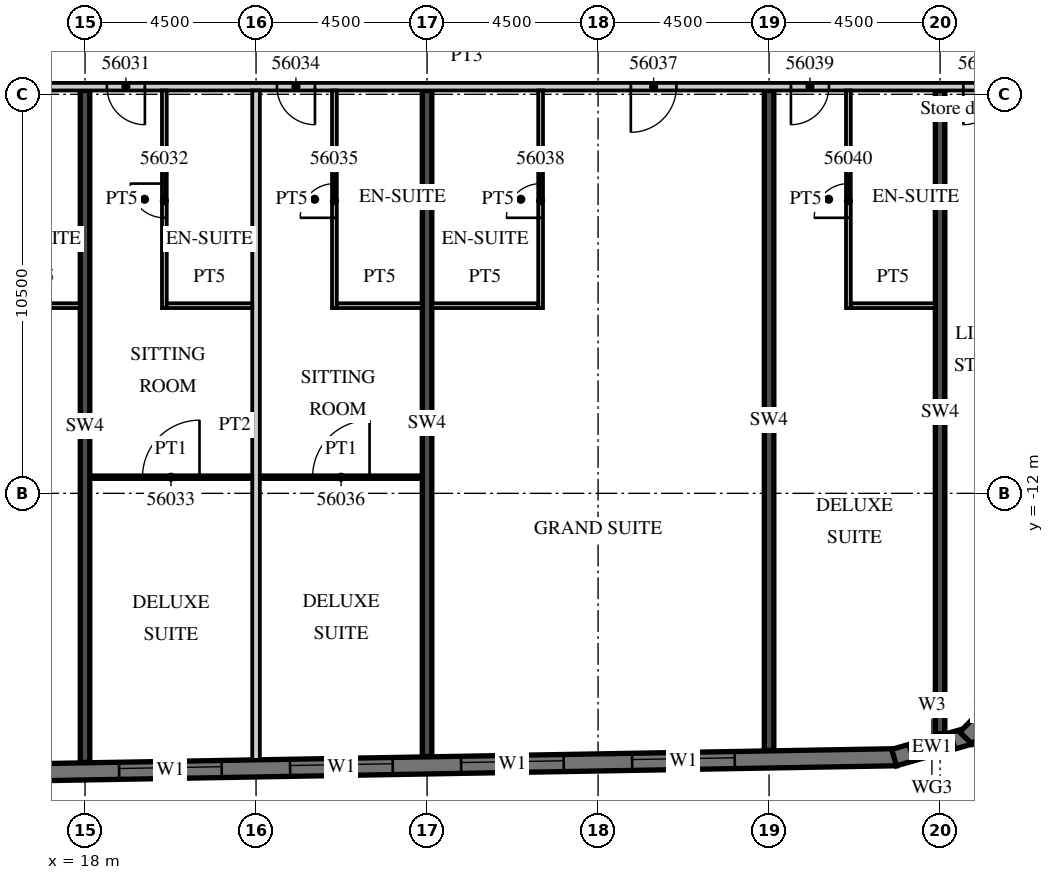
"""IFC4 building model, lengths in metres.
Left out: names, types, materials, properties, quantities, classifications, styles, units other than length and angle.
Written with IfcOpenShell. Run it as: python <this file> out.ifc"""

import sys

from ifc_helpers import new_model, si_unit, direction, frame, frame_2d, origin, place, context, subcontext, project, spatial, polyline, rectangle, outline, extrude, element, fill, save


model = new_model("IFC4")
c1 = context("Model", 3, precision=1e-05, world=origin(), true_north=direction((0.0, 1.0)))
c2 = subcontext(c1, "Body", "Model", "MODEL_VIEW")
j1 = project(units=[si_unit("LENGTHUNIT", "METRE"), si_unit("PLANEANGLEUNIT", "RADIAN")], contexts=[c1])
p1 = place(None, origin())
s1 = spatial("IfcSite", under=j1, at=p1, CompositionType="ELEMENT")
p2 = place(p1, origin())
s2 = spatial("IfcBuilding", under=s1, at=p2, CompositionType="ELEMENT")
p3 = place(p2, frame((0.0, 0.0, 230.9)))
s3 = spatial("IfcBuildingStorey", under=s2, at=p3, CompositionType="ELEMENT", Elevation=230.9)
p4 = place(p3, frame((18.0, -19.079, 0.0), z_axis=(0.0, 0.0, 1.0), x_axis=(0.0, 1.0, 0.0)))
e1 = element("IfcWall", 1, at=p4, inside=s3, PredefinedType="SHEAR", context=c2, shape_type="SweptSolid", body=[
    extrude(rectangle(XDim=17.679, YDim=0.25, at=frame_2d((8.84, 0.0))), origin(), (0.0, 0.0, 1.0), 3.3),
])
p5 = place(p3, frame((27.0, -18.922, 0.0), z_axis=(0.0, 0.0, 1.0), x_axis=(0.0, 1.0, 0.0)))
e2 = element("IfcWall", 2, at=p5, inside=s3, PredefinedType="SHEAR", context=c2, shape_type="SweptSolid", body=[
    extrude(rectangle(XDim=17.522, YDim=0.25, at=frame_2d((8.761, 0.0))), origin(), (0.0, 0.0, 1.0), 3.3),
])
p6 = place(p3, frame((36.0, -18.765, 0.0), z_axis=(0.0, 0.0, 1.0), x_axis=(0.0, 1.0, 0.0)))
e3 = element("IfcWall", 3, at=p6, inside=s3, PredefinedType="SHEAR", context=c2, shape_type="SweptSolid", body=[
    extrude(rectangle(XDim=17.365, YDim=0.25, at=frame_2d((8.683, 0.0))), origin(), (0.0, 0.0, 1.0), 3.3),
])
p7 = place(p3, frame((40.5, -18.325, 0.0), z_axis=(0.0, 0.0, 1.0), x_axis=(0.0, 1.0, 0.0)))
e4 = element("IfcWall", 4, at=p7, inside=s3, PredefinedType="SHEAR", context=c2, shape_type="SweptSolid", body=[
    extrude(rectangle(XDim=16.925, YDim=0.25, at=frame_2d((8.463, 0.0))), origin(), (0.0, 0.0, 1.0), 3.3),
])
p8 = place(p3, frame((-13.504, -19.866, 0.0), z_axis=(0.0, 0.0, 1.0), x_axis=(0.999847672978, 0.017453676992, 0.0)))
e5 = element("IfcWall", 5, at=p8, inside=s3, PredefinedType="SOLIDWALL", context=c2, shape_type="SweptSolid", body=[
    extrude(rectangle(XDim=52.86, YDim=0.45, at=frame_2d((26.43, 0.0))), origin(), (0.0, 0.0, 1.0), 3.02),
])
p9 = place(p8, frame((0.9, 0.0, 0.45)))
e6 = element("IfcOpeningElement", 6, at=p9, cuts=e5, PredefinedType="OPENING", context=c2, shape_type="SweptSolid", body=[
    extrude(rectangle(XDim=2.7, YDim=2.25, at=frame_2d((1.35, 1.125))), frame((0.0, 0.235, 0.0), z_axis=(0.0, -1.0, 0.0), x_axis=(1.0, 0.0, 0.0)), (0.0, 0.0, 1.0), 0.47),
])
p10 = place(p8, frame((5.401, 0.0, 0.45)))
e7 = element("IfcOpeningElement", 7, at=p10, cuts=e5, PredefinedType="OPENING", context=c2, shape_type="SweptSolid", body=[
    extrude(rectangle(XDim=2.7, YDim=2.25, at=frame_2d((1.35, 1.125))), frame((0.0, 0.235, 0.0), z_axis=(0.0, -1.0, 0.0), x_axis=(1.0, 0.0, 0.0)), (0.0, 0.0, 1.0), 0.47),
])
p11 = place(p8, frame((9.902, 0.0, 0.45)))
e8 = element("IfcOpeningElement", 8, at=p11, cuts=e5, PredefinedType="OPENING", context=c2, shape_type="SweptSolid", body=[
    extrude(rectangle(XDim=2.7, YDim=2.25, at=frame_2d((1.35, 1.125))), frame((0.0, 0.235, 0.0), z_axis=(0.0, -1.0, 0.0), x_axis=(1.0, 0.0, 0.0)), (0.0, 0.0, 1.0), 0.47),
])
p12 = place(p8, frame((14.402, 0.0, 0.45)))
e9 = element("IfcOpeningElement", 9, at=p12, cuts=e5, PredefinedType="OPENING", context=c2, shape_type="SweptSolid", body=[
    extrude(rectangle(XDim=2.7, YDim=2.25, at=frame_2d((1.35, 1.125))), frame((0.0, 0.235, 0.0), z_axis=(0.0, -1.0, 0.0), x_axis=(1.0, 0.0, 0.0)), (0.0, 0.0, 1.0), 0.47),
])
p13 = place(p8, frame((18.903, 0.0, 0.45)))
e10 = element("IfcOpeningElement", 10, at=p13, cuts=e5, PredefinedType="OPENING", context=c2, shape_type="SweptSolid", body=[
    extrude(rectangle(XDim=2.7, YDim=2.25, at=frame_2d((1.35, 1.125))), frame((0.0, 0.235, 0.0), z_axis=(0.0, -1.0, 0.0), x_axis=(1.0, 0.0, 0.0)), (0.0, 0.0, 1.0), 0.47),
])
p14 = place(p8, frame((23.404, 0.0, 0.45)))
e11 = element("IfcOpeningElement", 11, at=p14, cuts=e5, PredefinedType="OPENING", context=c2, shape_type="SweptSolid", body=[
    extrude(rectangle(XDim=2.7, YDim=2.25, at=frame_2d((1.35, 1.125))), frame((0.0, 0.235, 0.0), z_axis=(0.0, -1.0, 0.0), x_axis=(1.0, 0.0, 0.0)), (0.0, 0.0, 1.0), 0.47),
])
p15 = place(p8, frame((27.904, 0.0, 0.45)))
e12 = element("IfcOpeningElement", 12, at=p15, cuts=e5, PredefinedType="OPENING", context=c2, shape_type="SweptSolid", body=[
    extrude(rectangle(XDim=2.7, YDim=2.25, at=frame_2d((1.35, 1.125))), frame((0.0, 0.235, 0.0), z_axis=(0.0, -1.0, 0.0), x_axis=(1.0, 0.0, 0.0)), (0.0, 0.0, 1.0), 0.47),
])
p16 = place(p8, frame((32.405, 0.0, 0.45)))
e13 = element("IfcOpeningElement", 13, at=p16, cuts=e5, PredefinedType="OPENING", context=c2, shape_type="SweptSolid", body=[
    extrude(rectangle(XDim=2.7, YDim=2.25, at=frame_2d((1.35, 1.125))), frame((0.0, 0.235, 0.0), z_axis=(0.0, -1.0, 0.0), x_axis=(1.0, 0.0, 0.0)), (0.0, 0.0, 1.0), 0.47),
])
p17 = place(p8, frame((36.906, 0.0, 0.45)))
e14 = element("IfcOpeningElement", 14, at=p17, cuts=e5, PredefinedType="OPENING", context=c2, shape_type="SweptSolid", body=[
    extrude(rectangle(XDim=2.7, YDim=2.25, at=frame_2d((1.35, 1.125))), frame((0.0, 0.235, 0.0), z_axis=(0.0, -1.0, 0.0), x_axis=(1.0, 0.0, 0.0)), (0.0, 0.0, 1.0), 0.47),
])
p18 = place(p8, frame((41.406, 0.0, 0.45)))
e15 = element("IfcOpeningElement", 15, at=p18, cuts=e5, PredefinedType="OPENING", context=c2, shape_type="SweptSolid", body=[
    extrude(rectangle(XDim=2.7, YDim=2.25, at=frame_2d((1.35, 1.125))), frame((0.0, 0.235, 0.0), z_axis=(0.0, -1.0, 0.0), x_axis=(1.0, 0.0, 0.0)), (0.0, 0.0, 1.0), 0.47),
])
p19 = place(p8, frame((45.907, 0.0, 0.45)))
e16 = element("IfcOpeningElement", 16, at=p19, cuts=e5, PredefinedType="OPENING", context=c2, shape_type="SweptSolid", body=[
    extrude(rectangle(XDim=2.7, YDim=2.25, at=frame_2d((1.35, 1.125))), frame((0.0, 0.235, 0.0), z_axis=(0.0, -1.0, 0.0), x_axis=(1.0, 0.0, 0.0)), (0.0, 0.0, 1.0), 0.47),
])
p20 = place(p3, frame((39.29, -18.952, 0.0), z_axis=(0.0, 0.0, 1.0), x_axis=(0.961247584925, 0.275686562016, 0.0)))
e17 = element("IfcWall", 17, at=p20, inside=s3, PredefinedType="SOLIDWALL", context=c2, shape_type="SweptSolid", body=[
    extrude(outline(polyline([(0.0, -0.225), (2.071, -0.225), (1.95, 0.225), (0.121, 0.225), (0.0, -0.225)])), origin(), (0.0, 0.0, 1.0), 3.02),
])
p21 = place(p20, frame((0.435, 0.0, 0.45)))
e18 = element("IfcOpeningElement", 18, at=p21, cuts=e17, PredefinedType="OPENING", context=c2, shape_type="SweptSolid", body=[
    extrude(rectangle(XDim=1.2, YDim=2.25, at=frame_2d((0.6, 1.125))), frame((0.0, 0.235, 0.0), z_axis=(0.0, -1.0, 0.0), x_axis=(1.0, 0.0, 0.0)), (0.0, 0.0, 1.0), 0.47),
])
p22 = place(p3, frame((41.181, -18.442, 0.0), z_axis=(0.0, 0.0, 1.0), x_axis=(0.694678672846, 0.719320193998, 0.0)))
e19 = element("IfcWall", 19, at=p22, inside=s3, PredefinedType="SOLIDWALL", context=c2, shape_type="SweptSolid", body=[
    extrude(outline(polyline([(0.0, -0.225), (2.071, -0.225), (1.95, 0.225), (0.121, 0.225), (0.0, -0.225)])), origin(), (0.0, 0.0, 1.0), 3.02),
])
p23 = place(p3, frame((13.5, -1.3, 0.0), z_axis=(0.0, 0.0, 1.0), x_axis=(1.0, 0.0, 0.0)))
e20 = element("IfcWall", 20, at=p23, inside=s3, PredefinedType="PARTITIONING", context=c2, shape_type="SweptSolid", body=[
    extrude(rectangle(XDim=29.091, YDim=0.2, at=frame_2d((14.545, 0.0))), origin(), (0.0, 0.0, 1.0), 3.02),
])
p24 = place(p23, frame((0.575, 0.0, 0.0)))
e21 = element("IfcOpeningElement", 21, at=p24, cuts=e20, PredefinedType="OPENING", context=c2, shape_type="SweptSolid", body=[
    extrude(rectangle(XDim=1.0, YDim=2.1, at=frame_2d((0.5, 1.05))), frame((0.0, 0.11, 0.0), z_axis=(0.0, -1.0, 0.0), x_axis=(1.0, 0.0, 0.0)), (0.0, 0.0, 1.0), 0.22),
])
p25 = place(p23, frame((5.075, 0.0, 0.0)))
e22 = element("IfcOpeningElement", 22, at=p25, cuts=e20, PredefinedType="OPENING", context=c2, shape_type="SweptSolid", body=[
    extrude(rectangle(XDim=1.0, YDim=2.1, at=frame_2d((0.5, 1.05))), frame((0.0, 0.11, 0.0), z_axis=(0.0, -1.0, 0.0), x_axis=(1.0, 0.0, 0.0)), (0.0, 0.0, 1.0), 0.22),
])
p26 = place(p23, frame((9.55, 0.0, 0.0)))
e23 = element("IfcOpeningElement", 23, at=p26, cuts=e20, PredefinedType="OPENING", context=c2, shape_type="SweptSolid", body=[
    extrude(rectangle(XDim=1.0, YDim=2.1, at=frame_2d((0.5, 1.05))), frame((0.0, 0.11, 0.0), z_axis=(0.0, -1.0, 0.0), x_axis=(1.0, 0.0, 0.0)), (0.0, 0.0, 1.0), 0.22),
])
p27 = place(p23, frame((18.862, 0.0, 0.0)))
e24 = element("IfcOpeningElement", 24, at=p27, cuts=e20, PredefinedType="OPENING", context=c2, shape_type="SweptSolid", body=[
    extrude(rectangle(XDim=1.2, YDim=2.1, at=frame_2d((0.6, 1.05))), frame((0.0, 0.11, 0.0), z_axis=(0.0, -1.0, 0.0), x_axis=(1.0, 0.0, 0.0)), (0.0, 0.0, 1.0), 0.22),
])
p28 = place(p23, frame((23.075, 0.0, 0.0)))
e25 = element("IfcOpeningElement", 25, at=p28, cuts=e20, PredefinedType="OPENING", context=c2, shape_type="SweptSolid", body=[
    extrude(rectangle(XDim=1.0, YDim=2.1, at=frame_2d((0.5, 1.05))), frame((0.0, 0.11, 0.0), z_axis=(0.0, -1.0, 0.0), x_axis=(1.0, 0.0, 0.0)), (0.0, 0.0, 1.0), 0.22),
])
p29 = place(p23, frame((27.611, 0.0, 0.0)))
e26 = element("IfcOpeningElement", 26, at=p29, cuts=e20, PredefinedType="OPENING", context=c2, shape_type="SweptSolid", body=[
    extrude(rectangle(XDim=1.0, YDim=2.4, at=frame_2d((0.5, 1.2))), frame((0.0, 0.11, 0.0), z_axis=(0.0, -1.0, 0.0), x_axis=(1.0, 0.0, 0.0)), (0.0, 0.0, 1.0), 0.22),
])
p30 = place(p3, frame((15.625, -7.062, 0.0), z_axis=(0.0, 0.0, 1.0), x_axis=(1.0, 0.0, 0.0)))
e27 = element("IfcWall", 27, at=p30, inside=s3, PredefinedType="PARTITIONING", context=c2, shape_type="SweptSolid", body=[
    extrude(rectangle(XDim=2.25, YDim=0.125, at=frame_2d((1.125, 0.0))), origin(), (0.0, 0.0, 1.0), 3.02),
])
p31 = place(p3, frame((22.5, -19.013, 0.0), z_axis=(0.0, 0.0, 1.0), x_axis=(0.0, 1.0, 0.0)))
e28 = element("IfcWall", 28, at=p31, inside=s3, PredefinedType="PARTITIONING", context=c2, shape_type="SweptSolid", body=[
    extrude(rectangle(XDim=17.613, YDim=0.2, at=frame_2d((8.807, 0.0))), origin(), (0.0, 0.0, 1.0), 3.02),
])
p32 = place(p3, frame((20.087, -7.125, 0.0), z_axis=(0.0, 0.0, 1.0), x_axis=(0.0, 1.0, 0.0)))
e29 = element("IfcWall", 29, at=p32, inside=s3, PredefinedType="PARTITIONING", context=c2, shape_type="SweptSolid", body=[
    extrude(rectangle(XDim=5.725, YDim=0.125, at=frame_2d((2.863, 0.0))), origin(), (0.0, 0.0, 1.0), 3.02),
])
p33 = place(p32, frame((2.375, 0.0, 0.0)))
e30 = element("IfcOpeningElement", 30, at=p33, cuts=e29, PredefinedType="OPENING", context=c2, shape_type="SweptSolid", body=[
    extrude(rectangle(XDim=0.9, YDim=2.1, at=frame_2d((0.45, 1.05))), frame((0.0, 0.073, 0.0), z_axis=(0.0, -1.0, 0.0), x_axis=(1.0, 0.0, 0.0)), (0.0, 0.0, 1.0), 0.145),
])
p34 = place(p3, frame((20.15, -7.062, 0.0), z_axis=(0.0, 0.0, 1.0), x_axis=(1.0, 0.0, 0.0)))
e31 = element("IfcWall", 31, at=p34, inside=s3, PredefinedType="PARTITIONING", context=c2, shape_type="SweptSolid", body=[
    extrude(rectangle(XDim=2.25, YDim=0.125, at=frame_2d((1.125, 0.0))), origin(), (0.0, 0.0, 1.0), 3.02),
])
p35 = place(p3, frame((18.125, -11.575, 0.0), z_axis=(0.0, 0.0, 1.0), x_axis=(1.0, 0.0, 0.0)))
e32 = element("IfcWall", 32, at=p35, inside=s3, PredefinedType="PARTITIONING", context=c2, shape_type="SweptSolid", body=[
    extrude(rectangle(XDim=4.275, YDim=0.1, at=frame_2d((2.137, 0.0))), origin(), (0.0, 0.0, 1.0), 3.02),
])
p36 = place(p35, frame((1.387, 0.0, 0.0)))
e33 = element("IfcOpeningElement", 33, at=p36, cuts=e32, PredefinedType="OPENING", context=c2, shape_type="SweptSolid", body=[
    extrude(rectangle(XDim=1.5, YDim=2.1, at=frame_2d((0.75, 1.05))), frame((0.0, 0.06, 0.0), z_axis=(0.0, -1.0, 0.0), x_axis=(1.0, 0.0, 0.0)), (0.0, 0.0, 1.0), 0.12),
])
p37 = place(p3, frame((24.562, -7.125, 0.0), z_axis=(0.0, 0.0, 1.0), x_axis=(0.0, 1.0, 0.0)))
e34 = element("IfcWall", 34, at=p37, inside=s3, PredefinedType="PARTITIONING", context=c2, shape_type="SweptSolid", body=[
    extrude(rectangle(XDim=5.725, YDim=0.125, at=frame_2d((2.863, 0.0))), origin(), (0.0, 0.0, 1.0), 3.02),
])
p38 = place(p37, frame((2.375, 0.0, 0.0)))
e35 = element("IfcOpeningElement", 35, at=p38, cuts=e34, PredefinedType="OPENING", context=c2, shape_type="SweptSolid", body=[
    extrude(rectangle(XDim=0.9, YDim=2.1, at=frame_2d((0.45, 1.05))), frame((0.0, 0.073, 0.0), z_axis=(0.0, -1.0, 0.0), x_axis=(1.0, 0.0, 0.0)), (0.0, 0.0, 1.0), 0.145),
])
p39 = place(p3, frame((24.625, -7.062, 0.0), z_axis=(0.0, 0.0, 1.0), x_axis=(1.0, 0.0, 0.0)))
e36 = element("IfcWall", 36, at=p39, inside=s3, PredefinedType="PARTITIONING", context=c2, shape_type="SweptSolid", body=[
    extrude(rectangle(XDim=2.25, YDim=0.125, at=frame_2d((1.125, 0.0))), origin(), (0.0, 0.0, 1.0), 3.02),
])
p40 = place(p3, frame((22.6, -11.575, 0.0), z_axis=(0.0, 0.0, 1.0), x_axis=(1.0, 0.0, 0.0)))
e37 = element("IfcWall", 37, at=p40, inside=s3, PredefinedType="PARTITIONING", context=c2, shape_type="SweptSolid", body=[
    extrude(rectangle(XDim=4.275, YDim=0.1, at=frame_2d((2.137, 0.0))), origin(), (0.0, 0.0, 1.0), 3.02),
])
p41 = place(p40, frame((1.387, 0.0, 0.0)))
e38 = element("IfcOpeningElement", 38, at=p41, cuts=e37, PredefinedType="OPENING", context=c2, shape_type="SweptSolid", body=[
    extrude(rectangle(XDim=1.5, YDim=2.1, at=frame_2d((0.75, 1.05))), frame((0.0, 0.06, 0.0), z_axis=(0.0, -1.0, 0.0), x_axis=(1.0, 0.0, 0.0)), (0.0, 0.0, 1.0), 0.12),
])
p42 = place(p3, frame((29.988, -7.125, 0.0), z_axis=(0.0, 0.0, 1.0), x_axis=(0.0, 1.0, 0.0)))
e39 = element("IfcWall", 39, at=p42, inside=s3, PredefinedType="PARTITIONING", context=c2, shape_type="SweptSolid", body=[
    extrude(rectangle(XDim=5.725, YDim=0.125, at=frame_2d((2.863, 0.0))), origin(), (0.0, 0.0, 1.0), 3.02),
])
p43 = place(p42, frame((2.375, 0.0, 0.0)))
e40 = element("IfcOpeningElement", 40, at=p43, cuts=e39, PredefinedType="OPENING", context=c2, shape_type="SweptSolid", body=[
    extrude(rectangle(XDim=0.9, YDim=2.1, at=frame_2d((0.45, 1.05))), frame((0.0, 0.073, 0.0), z_axis=(0.0, -1.0, 0.0), x_axis=(1.0, 0.0, 0.0)), (0.0, 0.0, 1.0), 0.145),
])
p44 = place(p3, frame((27.125, -7.062, 0.0), z_axis=(0.0, 0.0, 1.0), x_axis=(1.0, 0.0, 0.0)))
e41 = element("IfcWall", 41, at=p44, inside=s3, PredefinedType="PARTITIONING", context=c2, shape_type="SweptSolid", body=[
    extrude(rectangle(XDim=2.8, YDim=0.125, at=frame_2d((1.4, 0.0))), origin(), (0.0, 0.0, 1.0), 3.02),
])
p45 = place(p3, frame((38.087, -7.125, 0.0), z_axis=(0.0, 0.0, 1.0), x_axis=(0.0, 1.0, 0.0)))
e42 = element("IfcWall", 42, at=p45, inside=s3, PredefinedType="PARTITIONING", context=c2, shape_type="SweptSolid", body=[
    extrude(rectangle(XDim=5.725, YDim=0.125, at=frame_2d((2.863, 0.0))), origin(), (0.0, 0.0, 1.0), 3.02),
])
p46 = place(p45, frame((2.375, 0.0, 0.0)))
e43 = element("IfcOpeningElement", 43, at=p46, cuts=e42, PredefinedType="OPENING", context=c2, shape_type="SweptSolid", body=[
    extrude(rectangle(XDim=0.9, YDim=2.1, at=frame_2d((0.45, 1.05))), frame((0.0, 0.073, 0.0), z_axis=(0.0, -1.0, 0.0), x_axis=(1.0, 0.0, 0.0)), (0.0, 0.0, 1.0), 0.145),
])
p47 = place(p3, frame((38.15, -7.062, 0.0), z_axis=(0.0, 0.0, 1.0), x_axis=(1.0, 0.0, 0.0)))
e44 = element("IfcWall", 44, at=p47, inside=s3, PredefinedType="PARTITIONING", context=c2, shape_type="SweptSolid", body=[
    extrude(rectangle(XDim=2.225, YDim=0.125, at=frame_2d((1.113, 0.0))), origin(), (0.0, 0.0, 1.0), 3.02),
])
p48 = place(p16, origin())
e45 = element("IfcWindow", 45, at=p48, inside=s3, PartitioningType="SINGLE_PANEL", PredefinedType="WINDOW", context=c2, shape_type="SweptSolid", body=[
    extrude(rectangle(XDim=2.7, YDim=2.25, at=frame_2d((1.35, 1.125))), frame((0.0, 0.09, 0.0), z_axis=(0.0, -1.0, 0.0), x_axis=(1.0, 0.0, 0.0)), (0.0, 0.0, 1.0), 0.06),
])
fill(e13, e45)
p49 = place(p17, origin())
e46 = element("IfcWindow", 46, at=p49, inside=s3, PartitioningType="SINGLE_PANEL", PredefinedType="WINDOW", context=c2, shape_type="SweptSolid", body=[
    extrude(rectangle(XDim=2.7, YDim=2.25, at=frame_2d((1.35, 1.125))), frame((0.0, 0.09, 0.0), z_axis=(0.0, -1.0, 0.0), x_axis=(1.0, 0.0, 0.0)), (0.0, 0.0, 1.0), 0.06),
])
fill(e14, e46)
p50 = place(p18, origin())
e47 = element("IfcWindow", 47, at=p50, inside=s3, PartitioningType="SINGLE_PANEL", PredefinedType="WINDOW", context=c2, shape_type="SweptSolid", body=[
    extrude(rectangle(XDim=2.7, YDim=2.25, at=frame_2d((1.35, 1.125))), frame((0.0, 0.09, 0.0), z_axis=(0.0, -1.0, 0.0), x_axis=(1.0, 0.0, 0.0)), (0.0, 0.0, 1.0), 0.06),
])
fill(e15, e47)
p51 = place(p19, origin())
e48 = element("IfcWindow", 48, at=p51, inside=s3, PartitioningType="SINGLE_PANEL", PredefinedType="WINDOW", context=c2, shape_type="SweptSolid", body=[
    extrude(rectangle(XDim=2.7, YDim=2.25, at=frame_2d((1.35, 1.125))), frame((0.0, 0.09, 0.0), z_axis=(0.0, -1.0, 0.0), x_axis=(1.0, 0.0, 0.0)), (0.0, 0.0, 1.0), 0.06),
])
fill(e16, e48)
p52 = place(p21, origin())
e49 = element("IfcWindow", 49, at=p52, inside=s3, PartitioningType="SINGLE_PANEL", PredefinedType="WINDOW", context=c2, shape_type="SweptSolid", body=[
    extrude(rectangle(XDim=1.2, YDim=2.25, at=frame_2d((0.6, 1.125))), frame((0.0, 0.09, 0.0), z_axis=(0.0, -1.0, 0.0), x_axis=(1.0, 0.0, 0.0)), (0.0, 0.0, 1.0), 0.06),
])
fill(e18, e49)
p53 = place(p25, origin())
e50 = element("IfcDoor", 50, at=p53, inside=s3, OperationType="SINGLE_SWING_RIGHT", PredefinedType="DOOR", context=c2, shape_type="SweptSolid", body=[
    extrude(rectangle(XDim=1.0, YDim=2.1, at=frame_2d((0.5, 1.05))), frame((0.0, 0.025, 0.0), z_axis=(0.0, -1.0, 0.0), x_axis=(1.0, 0.0, 0.0)), (0.0, 0.0, 1.0), 0.05),
])
fill(e22, e50)
p54 = place(p33, origin())
e51 = element("IfcDoor", 51, at=p54, inside=s3, OperationType="SINGLE_SWING_RIGHT", PredefinedType="DOOR", context=c2, shape_type="SweptSolid", body=[
    extrude(rectangle(XDim=0.9, YDim=2.1, at=frame_2d((0.45, 1.05))), frame((0.0, 0.025, 0.0), z_axis=(0.0, -1.0, 0.0), x_axis=(1.0, 0.0, 0.0)), (0.0, 0.0, 1.0), 0.05),
])
fill(e30, e51)
p55 = place(p36, origin())
e52 = element("IfcDoor", 52, at=p55, inside=s3, OperationType="SINGLE_SWING_RIGHT", PredefinedType="DOOR", context=c2, shape_type="SweptSolid", body=[
    extrude(rectangle(XDim=1.5, YDim=2.1, at=frame_2d((0.75, 1.05))), frame((0.0, 0.025, 0.0), z_axis=(0.0, -1.0, 0.0), x_axis=(1.0, 0.0, 0.0)), (0.0, 0.0, 1.0), 0.05),
])
fill(e33, e52)
p56 = place(p26, origin())
e53 = element("IfcDoor", 53, at=p56, inside=s3, OperationType="SINGLE_SWING_RIGHT", PredefinedType="DOOR", context=c2, shape_type="SweptSolid", body=[
    extrude(rectangle(XDim=1.0, YDim=2.1, at=frame_2d((0.5, 1.05))), frame((0.0, 0.025, 0.0), z_axis=(0.0, -1.0, 0.0), x_axis=(1.0, 0.0, 0.0)), (0.0, 0.0, 1.0), 0.05),
])
fill(e23, e53)
p57 = place(p38, origin())
e54 = element("IfcDoor", 54, at=p57, inside=s3, OperationType="SINGLE_SWING_LEFT", PredefinedType="DOOR", context=c2, shape_type="SweptSolid", body=[
    extrude(rectangle(XDim=0.9, YDim=2.1, at=frame_2d((0.45, 1.05))), frame((0.0, 0.025, 0.0), z_axis=(0.0, -1.0, 0.0), x_axis=(1.0, 0.0, 0.0)), (0.0, 0.0, 1.0), 0.05),
])
fill(e35, e54)
p58 = place(p41, origin())
e55 = element("IfcDoor", 55, at=p58, inside=s3, OperationType="SINGLE_SWING_RIGHT", PredefinedType="DOOR", context=c2, shape_type="SweptSolid", body=[
    extrude(rectangle(XDim=1.5, YDim=2.1, at=frame_2d((0.75, 1.05))), frame((0.0, 0.025, 0.0), z_axis=(0.0, -1.0, 0.0), x_axis=(1.0, 0.0, 0.0)), (0.0, 0.0, 1.0), 0.05),
])
fill(e38, e55)
p59 = place(p27, origin())
e56 = element("IfcDoor", 56, at=p59, inside=s3, OperationType="SINGLE_SWING_LEFT", PredefinedType="DOOR", context=c2, shape_type="SweptSolid", body=[
    extrude(rectangle(XDim=1.2, YDim=2.1, at=frame_2d((0.6, 1.05))), frame((0.0, 0.025, 0.0), z_axis=(0.0, -1.0, 0.0), x_axis=(1.0, 0.0, 0.0)), (0.0, 0.0, 1.0), 0.05),
])
fill(e24, e56)
p60 = place(p43, origin())
e57 = element("IfcDoor", 57, at=p60, inside=s3, OperationType="SINGLE_SWING_LEFT", PredefinedType="DOOR", context=c2, shape_type="SweptSolid", body=[
    extrude(rectangle(XDim=0.9, YDim=2.1, at=frame_2d((0.45, 1.05))), frame((0.0, 0.025, 0.0), z_axis=(0.0, -1.0, 0.0), x_axis=(1.0, 0.0, 0.0)), (0.0, 0.0, 1.0), 0.05),
])
fill(e40, e57)
p61 = place(p28, origin())
e58 = element("IfcDoor", 58, at=p61, inside=s3, OperationType="SINGLE_SWING_LEFT", PredefinedType="DOOR", context=c2, shape_type="SweptSolid", body=[
    extrude(rectangle(XDim=1.0, YDim=2.1, at=frame_2d((0.5, 1.05))), frame((0.0, 0.025, 0.0), z_axis=(0.0, -1.0, 0.0), x_axis=(1.0, 0.0, 0.0)), (0.0, 0.0, 1.0), 0.05),
])
fill(e25, e58)
p62 = place(p46, origin())
e59 = element("IfcDoor", 59, at=p62, inside=s3, OperationType="SINGLE_SWING_LEFT", PredefinedType="DOOR", context=c2, shape_type="SweptSolid", body=[
    extrude(rectangle(XDim=0.9, YDim=2.1, at=frame_2d((0.45, 1.05))), frame((0.0, 0.025, 0.0), z_axis=(0.0, -1.0, 0.0), x_axis=(1.0, 0.0, 0.0)), (0.0, 0.0, 1.0), 0.05),
])
fill(e43, e59)
p63 = place(p29, origin())
e60 = element("IfcDoor", 60, at=p63, inside=s3, OperationType="SINGLE_SWING_LEFT", PredefinedType="DOOR", context=c2, shape_type="SweptSolid", body=[
    extrude(rectangle(XDim=1.0, YDim=2.4, at=frame_2d((0.5, 1.2))), frame((0.0, 0.025, 0.0), z_axis=(0.0, -1.0, 0.0), x_axis=(1.0, 0.0, 0.0)), (0.0, 0.0, 1.0), 0.05),
])
fill(e26, e60)
save(model, sys.argv[1])
